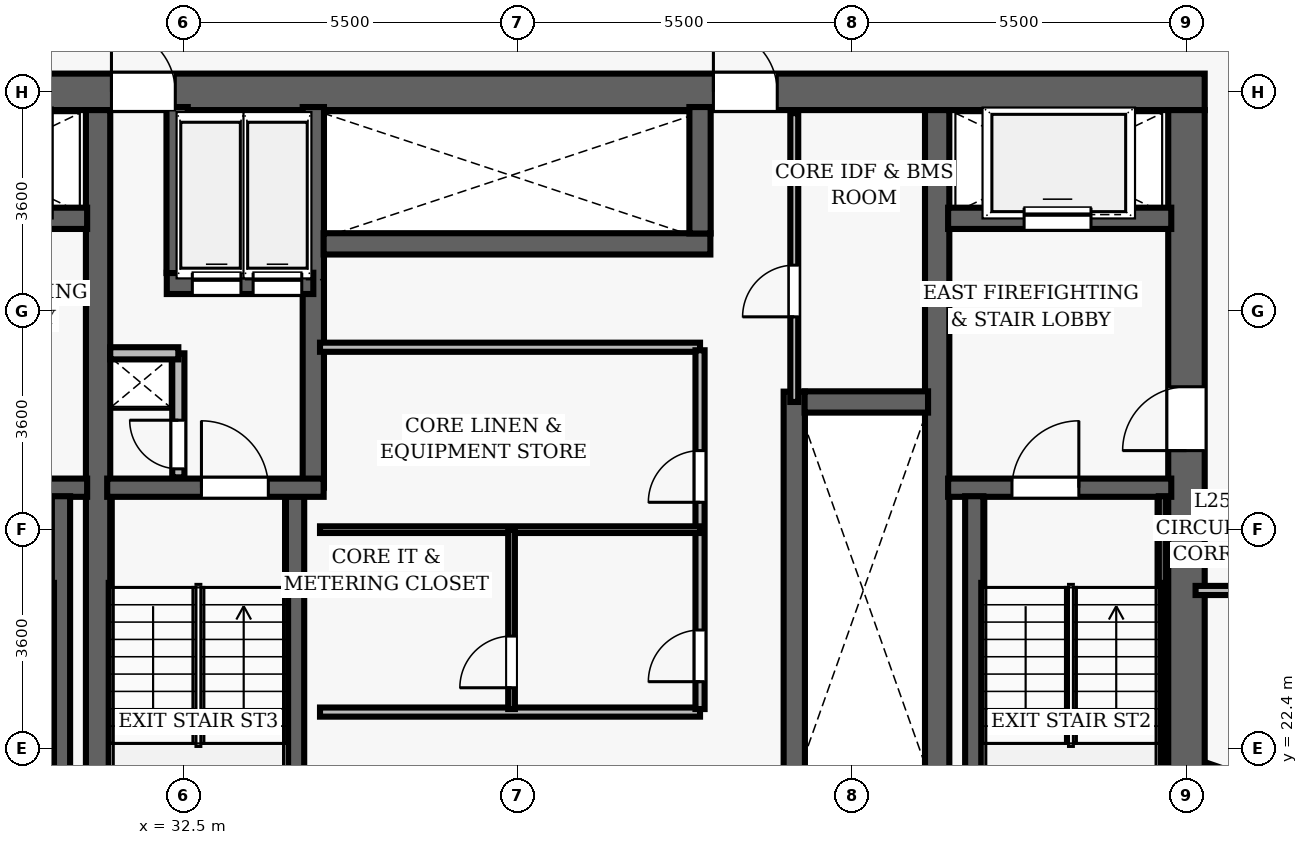
"""IFC4 building model, lengths in metres.
Left out: names, types, materials, properties, quantities, classifications, styles, units other than length and angle.
Written with IfcOpenShell. Run it as: python <this file> out.ifc"""

import sys

from ifc_helpers import new_model, si_unit, direction, frame, frame_2d, origin, place, context, subcontext, project, spatial, rectangle, extrude, element, fill, save


model = new_model("IFC4")
c1 = context("Model", 3, precision=1e-05, world=origin(), true_north=direction((0.0, 1.0)))
c2 = subcontext(c1, "Body", "Model", "MODEL_VIEW")
j1 = project(units=[si_unit("LENGTHUNIT", "METRE"), si_unit("PLANEANGLEUNIT", "RADIAN")], contexts=[c1])
p1 = place(None, origin())
s1 = spatial("IfcSite", under=j1, at=p1, CompositionType="ELEMENT")
p2 = place(p1, origin())
s2 = spatial("IfcBuilding", under=s1, at=p2, CompositionType="ELEMENT")
p3 = place(p2, frame((0.0, 0.0, 106.3)))
s3 = spatial("IfcBuildingStorey", under=s2, at=p3, CompositionType="ELEMENT", Elevation=106.3)
p4 = place(p3, frame((26.7, 33.2, 0.0), z_axis=(0.0, 0.0, 1.0), x_axis=(1.0, 0.0, 0.0)))
e1 = element("IfcWall", 1, at=p4, inside=s3, PredefinedType="SHEAR", context=c2, shape_type="SweptSolid", body=[
    extrude(rectangle(XDim=22.6, YDim=0.6, at=frame_2d((11.3, 0.0))), origin(), (0.0, 0.0, 1.0), 3.5),
])
p5 = place(p4, frame((4.62, 0.0, 0.0)))
e2 = element("IfcOpeningElement", 2, at=p5, cuts=e1, PredefinedType="OPENING", context=c2, shape_type="SweptSolid", body=[
    extrude(rectangle(XDim=1.05, YDim=2.15, at=frame_2d((0.525, 1.075))), frame((0.0, 0.31, 0.0), z_axis=(0.0, -1.0, 0.0), x_axis=(1.0, 0.0, 0.0)), (0.0, 0.0, 1.0), 0.62),
])
p6 = place(p4, frame((14.52, 0.0, 0.0)))
e3 = element("IfcOpeningElement", 3, at=p6, cuts=e1, PredefinedType="OPENING", context=c2, shape_type="SweptSolid", body=[
    extrude(rectangle(XDim=1.05, YDim=2.15, at=frame_2d((0.525, 1.075))), frame((0.0, 0.31, 0.0), z_axis=(0.0, -1.0, 0.0), x_axis=(1.0, 0.0, 0.0)), (0.0, 0.0, 1.0), 0.62),
])
p7 = place(p3, frame((49.0, 19.1, 0.0), z_axis=(0.0, 0.0, 1.0), x_axis=(0.0, 1.0, 0.0)))
e4 = element("IfcWall", 4, at=p7, inside=s3, PredefinedType="SHEAR", context=c2, shape_type="SweptSolid", body=[
    extrude(rectangle(XDim=13.8, YDim=0.6, at=frame_2d((6.9, 0.0))), origin(), (0.0, 0.0, 1.0), 3.5),
])
p8 = place(p7, frame((8.2, 0.0, 0.0)))
e5 = element("IfcOpeningElement", 5, at=p8, cuts=e4, PredefinedType="OPENING", context=c2, shape_type="SweptSolid", body=[
    extrude(rectangle(XDim=1.05, YDim=2.15, at=frame_2d((0.525, 1.075))), frame((0.0, 0.31, 0.0), z_axis=(0.0, -1.0, 0.0), x_axis=(1.0, 0.0, 0.0)), (0.0, 0.0, 1.0), 0.62),
])
for number, where, z_axis, x_axis in (
    (6, (31.1, 19.1, 0.0), (0.0, 0.0, 1.0), (0.0, 1.0, 0.0)),
    (7, (44.9, 19.1, 0.0), (0.0, 0.0, 1.0), (0.0, 1.0, 0.0)),
):
    element("IfcWall", number, at=place(p3, frame(where, z_axis=z_axis, x_axis=x_axis)), inside=s3, PredefinedType="SHEAR", context=c2, shape_type="SweptSolid", body=[
        extrude(rectangle(XDim=13.8, YDim=0.4, at=frame_2d((6.9, 0.0))), origin(), (0.0, 0.0, 1.0), 3.5),
    ])
p9 = place(p3, frame((27.25, 26.69, 0.0), z_axis=(0.0, 0.0, 1.0), x_axis=(1.0, 0.0, 0.0)))
e8 = element("IfcWall", 8, at=p9, inside=s3, PredefinedType="SHEAR", context=c2, shape_type="SweptSolid", body=[
    extrude(rectangle(XDim=3.67, YDim=0.3, at=frame_2d((1.835, 0.0))), origin(), (0.0, 0.0, 1.0), 3.5),
])
p10 = place(p9, frame((1.05, 0.0, 0.0)))
e9 = element("IfcOpeningElement", 9, at=p10, cuts=e8, PredefinedType="OPENING", context=c2, shape_type="SweptSolid", body=[
    extrude(rectangle(XDim=1.1, YDim=2.15, at=frame_2d((0.55, 1.075))), frame((0.0, 0.16, 0.0), z_axis=(0.0, -1.0, 0.0), x_axis=(1.0, 0.0, 0.0)), (0.0, 0.0, 1.0), 0.32),
])
p11 = place(p3, frame((30.49, 19.05, 0.0), z_axis=(0.0, 0.0, 1.0), x_axis=(0.0, 1.0, 0.0)))
e10 = element("IfcWall", 10, at=p11, inside=s3, PredefinedType="SHEAR", context=c2, shape_type="SweptSolid", body=[
    extrude(rectangle(XDim=7.5, YDim=0.3, at=frame_2d((3.75, 0.0))), origin(), (0.0, 0.0, 1.0), 3.5),
])
p12 = place(p3, frame((27.25, 31.12, 0.0), z_axis=(0.0, 0.0, 1.0), x_axis=(1.0, 0.0, 0.0)))
e11 = element("IfcWall", 11, at=p12, inside=s3, PredefinedType="SHEAR", context=c2, shape_type="SweptSolid", body=[
    extrude(rectangle(XDim=3.67, YDim=0.35, at=frame_2d((1.835, 0.0))), origin(), (0.0, 0.0, 1.0), 2.675),
])
p13 = place(p12, frame((1.25, 0.0, 0.0)))
e12 = element("IfcOpeningElement", 12, at=p13, cuts=e11, PredefinedType="OPENING", context=c2, shape_type="SweptSolid", body=[
    extrude(rectangle(XDim=1.1, YDim=2.15, at=frame_2d((0.55, 1.075))), frame((0.0, 0.185, 0.0), z_axis=(0.0, -1.0, 0.0), x_axis=(1.0, 0.0, 0.0)), (0.0, 0.0, 1.0), 0.37),
])
p14 = place(p3, frame((45.08, 26.69, 0.0), z_axis=(0.0, 0.0, 1.0), x_axis=(1.0, 0.0, 0.0)))
e13 = element("IfcWall", 13, at=p14, inside=s3, PredefinedType="SHEAR", context=c2, shape_type="SweptSolid", body=[
    extrude(rectangle(XDim=3.67, YDim=0.3, at=frame_2d((1.835, 0.0))), origin(), (0.0, 0.0, 1.0), 3.5),
])
p15 = place(p14, frame((1.05, 0.0, 0.0)))
e14 = element("IfcOpeningElement", 14, at=p15, cuts=e13, PredefinedType="OPENING", context=c2, shape_type="SweptSolid", body=[
    extrude(rectangle(XDim=1.1, YDim=2.15, at=frame_2d((0.55, 1.075))), frame((0.0, 0.16, 0.0), z_axis=(0.0, -1.0, 0.0), x_axis=(1.0, 0.0, 0.0)), (0.0, 0.0, 1.0), 0.32),
])
p16 = place(p3, frame((45.51, 19.05, 0.0), z_axis=(0.0, 0.0, 1.0), x_axis=(0.0, 1.0, 0.0)))
e15 = element("IfcWall", 15, at=p16, inside=s3, PredefinedType="SHEAR", context=c2, shape_type="SweptSolid", body=[
    extrude(rectangle(XDim=7.5, YDim=0.3, at=frame_2d((3.75, 0.0))), origin(), (0.0, 0.0, 1.0), 3.5),
])
p17 = place(p3, frame((48.605, 19.1, 0.0), z_axis=(0.0, 0.0, 1.0), x_axis=(0.0, 1.0, 0.0)))
e16 = element("IfcWall", 16, at=p17, inside=s3, PredefinedType="SHEAR", context=c2, shape_type="SweptSolid", body=[
    extrude(rectangle(XDim=7.45, YDim=0.12, at=frame_2d((3.725, 0.0))), origin(), (0.0, 0.0, 1.0), 3.5),
])
p18 = place(p3, frame((45.08, 31.12, 0.0), z_axis=(0.0, 0.0, 1.0), x_axis=(1.0, 0.0, 0.0)))
e17 = element("IfcWall", 17, at=p18, inside=s3, PredefinedType="SHEAR", context=c2, shape_type="SweptSolid", body=[
    extrude(rectangle(XDim=3.67, YDim=0.35, at=frame_2d((1.835, 0.0))), origin(), (0.0, 0.0, 1.0), 2.675),
])
p19 = place(p18, frame((1.25, 0.0, 0.0)))
e18 = element("IfcOpeningElement", 18, at=p19, cuts=e17, PredefinedType="OPENING", context=c2, shape_type="SweptSolid", body=[
    extrude(rectangle(XDim=1.1, YDim=2.15, at=frame_2d((0.55, 1.075))), frame((0.0, 0.185, 0.0), z_axis=(0.0, -1.0, 0.0), x_axis=(1.0, 0.0, 0.0)), (0.0, 0.0, 1.0), 0.37),
])
p20 = place(p3, frame((34.34, 19.05, 0.0), z_axis=(0.0, 0.0, 1.0), x_axis=(0.0, 1.0, 0.0)))
e19 = element("IfcWall", 19, at=p20, inside=s3, PredefinedType="SHEAR", context=c2, shape_type="SweptSolid", body=[
    extrude(rectangle(XDim=7.5, YDim=0.3, at=frame_2d((3.75, 0.0))), origin(), (0.0, 0.0, 1.0), 3.5),
])
p21 = place(p3, frame((34.64, 26.69, 0.0), z_axis=(0.0, 0.0, 1.0), x_axis=(0.0, 1.0, 0.0)))
e20 = element("IfcWall", 20, at=p21, inside=s3, PredefinedType="SHEAR", context=c2, shape_type="SweptSolid", body=[
    extrude(rectangle(XDim=6.26, YDim=0.35, at=frame_2d((3.13, 0.0))), origin(), (0.0, 0.0, 1.0), 3.5),
])
p22 = place(p3, frame((31.25, 26.69, 0.0), z_axis=(0.0, 0.0, 1.0), x_axis=(1.0, 0.0, 0.0)))
e21 = element("IfcWall", 21, at=p22, inside=s3, PredefinedType="SHEAR", context=c2, shape_type="SweptSolid", body=[
    extrude(rectangle(XDim=3.56, YDim=0.3, at=frame_2d((1.78, 0.0))), origin(), (0.0, 0.0, 1.0), 3.5),
])
p23 = place(p22, frame((1.55, 0.0, 0.0)))
e22 = element("IfcOpeningElement", 22, at=p23, cuts=e21, PredefinedType="OPENING", context=c2, shape_type="SweptSolid", body=[
    extrude(rectangle(XDim=1.1, YDim=2.15, at=frame_2d((0.55, 1.075))), frame((0.0, 0.16, 0.0), z_axis=(0.0, -1.0, 0.0), x_axis=(1.0, 0.0, 0.0)), (0.0, 0.0, 1.0), 0.32),
])
p24 = place(p3, frame((32.23, 30.05, 0.0), z_axis=(0.0, 0.0, 1.0), x_axis=(1.0, 0.0, 0.0)))
e23 = element("IfcWall", 23, at=p24, inside=s3, PredefinedType="SHEAR", context=c2, shape_type="SweptSolid", body=[
    extrude(rectangle(XDim=2.41, YDim=0.35, at=frame_2d((1.205, 0.0))), origin(), (0.0, 0.0, 1.0), 2.675),
])
p25 = place(p24, frame((0.42, 0.0, 0.0)))
e24 = element("IfcOpeningElement", 24, at=p25, cuts=e23, PredefinedType="OPENING", context=c2, shape_type="SweptSolid", body=[
    extrude(rectangle(XDim=0.8, YDim=2.15, at=frame_2d((0.4, 1.075))), frame((0.0, 0.185, 0.0), z_axis=(0.0, -1.0, 0.0), x_axis=(1.0, 0.0, 0.0)), (0.0, 0.0, 1.0), 0.37),
])
p26 = place(p24, frame((1.42, 0.0, 0.0)))
e25 = element("IfcOpeningElement", 25, at=p26, cuts=e23, PredefinedType="OPENING", context=c2, shape_type="SweptSolid", body=[
    extrude(rectangle(XDim=0.8, YDim=2.15, at=frame_2d((0.4, 1.075))), frame((0.0, 0.185, 0.0), z_axis=(0.0, -1.0, 0.0), x_axis=(1.0, 0.0, 0.0)), (0.0, 0.0, 1.0), 0.37),
])
p27 = place(p3, frame((32.4, 30.22, 0.0), z_axis=(0.0, 0.0, 1.0), x_axis=(0.0, 1.0, 0.0)))
e26 = element("IfcWall", 26, at=p27, inside=s3, PredefinedType="SHEAR", context=c2, shape_type="SweptSolid", body=[
    extrude(rectangle(XDim=2.73, YDim=0.35, at=frame_2d((1.365, 0.0))), origin(), (0.0, 0.0, 1.0), 2.675),
])
p28 = place(p3, frame((32.42, 26.86, 0.0), z_axis=(0.0, 0.0, 1.0), x_axis=(0.0, 1.0, 0.0)))
e27 = element("IfcWall", 27, at=p28, inside=s3, PredefinedType="PARTITIONING", context=c2, shape_type="SweptSolid", body=[
    extrude(rectangle(XDim=2.04, YDim=0.2, at=frame_2d((1.02, 0.0))), origin(), (0.0, 0.0, 1.0), 2.675),
])
p29 = place(p28, frame((0.14, 0.0, 0.0)))
e28 = element("IfcOpeningElement", 28, at=p29, cuts=e27, PredefinedType="OPENING", context=c2, shape_type="SweptSolid", body=[
    extrude(rectangle(XDim=0.8, YDim=2.05, at=frame_2d((0.4, 1.025))), frame((0.0, 0.11, 0.0), z_axis=(0.0, -1.0, 0.0), x_axis=(1.0, 0.0, 0.0)), (0.0, 0.0, 1.0), 0.22),
])
p30 = place(p3, frame((31.3, 28.9, 0.0), z_axis=(0.0, 0.0, 1.0), x_axis=(1.0, 0.0, 0.0)))
e29 = element("IfcWall", 29, at=p30, inside=s3, PredefinedType="PARTITIONING", context=c2, shape_type="SweptSolid", body=[
    extrude(rectangle(XDim=1.12, YDim=0.2, at=frame_2d((0.56, 0.0))), origin(), (0.0, 0.0, 1.0), 2.675),
])
p31 = place(p3, frame((42.55, 21.73, 0.0), z_axis=(0.0, 0.0, 1.0), x_axis=(0.0, 1.0, 0.0)))
e30 = element("IfcWall", 30, at=p31, inside=s3, PredefinedType="SHEAR", context=c2, shape_type="SweptSolid", body=[
    extrude(rectangle(XDim=6.54, YDim=0.35, at=frame_2d((3.27, 0.0))), origin(), (0.0, 0.0, 1.0), 2.675),
])
p32 = place(p3, frame((42.72, 28.1, 0.0), z_axis=(0.0, 0.0, 1.0), x_axis=(1.0, 0.0, 0.0)))
e31 = element("IfcWall", 31, at=p32, inside=s3, PredefinedType="SHEAR", context=c2, shape_type="SweptSolid", body=[
    extrude(rectangle(XDim=2.03, YDim=0.35, at=frame_2d((1.015, 0.0))), origin(), (0.0, 0.0, 1.0), 2.675),
])
p33 = place(p3, frame((34.81, 30.7, 0.0), z_axis=(0.0, 0.0, 1.0), x_axis=(1.0, 0.0, 0.0)))
e32 = element("IfcWall", 32, at=p33, inside=s3, PredefinedType="SHEAR", context=c2, shape_type="SweptSolid", body=[
    extrude(rectangle(XDim=6.36, YDim=0.35, at=frame_2d((3.18, 0.0))), origin(), (0.0, 0.0, 1.0), 2.675),
])
p34 = place(p3, frame((41.0, 30.87, 0.0), z_axis=(0.0, 0.0, 1.0), x_axis=(0.0, 1.0, 0.0)))
e33 = element("IfcWall", 33, at=p34, inside=s3, PredefinedType="SHEAR", context=c2, shape_type="SweptSolid", body=[
    extrude(rectangle(XDim=2.08, YDim=0.35, at=frame_2d((1.04, 0.0))), origin(), (0.0, 0.0, 1.0), 2.675),
])
for number, where, z_axis, x_axis in (
    (34, (34.75, 29.0, 0.0), (0.0, 0.0, 1.0), (1.0, 0.0, 0.0)),
    (35, (34.75, 23.0, 0.0), (0.0, 0.0, 1.0), (1.0, 0.0, 0.0)),
):
    element("IfcWall", number, at=place(p3, frame(where, z_axis=z_axis, x_axis=x_axis)), inside=s3, PredefinedType="PARTITIONING", context=c2, shape_type="SweptSolid", body=[
        extrude(rectangle(XDim=6.25, YDim=0.15, at=frame_2d((3.125, 0.0))), origin(), (0.0, 0.0, 1.0), 2.675),
    ])
p35 = place(p3, frame((41.0, 23.05, 0.0), z_axis=(0.0, 0.0, 1.0), x_axis=(0.0, 1.0, 0.0)))
e36 = element("IfcWall", 36, at=p35, inside=s3, PredefinedType="PARTITIONING", context=c2, shape_type="SweptSolid", body=[
    extrude(rectangle(XDim=5.9, YDim=0.15, at=frame_2d((2.95, 0.0))), origin(), (0.0, 0.0, 1.0), 2.675),
])
p36 = place(p35, frame((3.4, 0.0, 0.0)))
e37 = element("IfcOpeningElement", 37, at=p36, cuts=e36, PredefinedType="OPENING", context=c2, shape_type="SweptSolid", body=[
    extrude(rectangle(XDim=0.85, YDim=2.1, at=frame_2d((0.425, 1.05))), frame((0.0, 0.085, 0.0), z_axis=(0.0, -1.0, 0.0), x_axis=(1.0, 0.0, 0.0)), (0.0, 0.0, 1.0), 0.17),
])
p37 = place(p35, frame((0.45, 0.0, 0.0)))
e38 = element("IfcOpeningElement", 38, at=p37, cuts=e36, PredefinedType="OPENING", context=c2, shape_type="SweptSolid", body=[
    extrude(rectangle(XDim=0.85, YDim=2.1, at=frame_2d((0.425, 1.05))), frame((0.0, 0.085, 0.0), z_axis=(0.0, -1.0, 0.0), x_axis=(1.0, 0.0, 0.0)), (0.0, 0.0, 1.0), 0.17),
])
p38 = place(p3, frame((34.75, 26.0, 0.0), z_axis=(0.0, 0.0, 1.0), x_axis=(1.0, 0.0, 0.0)))
e39 = element("IfcWall", 39, at=p38, inside=s3, PredefinedType="PARTITIONING", context=c2, shape_type="SweptSolid", body=[
    extrude(rectangle(XDim=6.25, YDim=0.11, at=frame_2d((3.125, 0.0))), origin(), (0.0, 0.0, 1.0), 2.675),
])
p39 = place(p3, frame((37.9, 23.05, 0.0), z_axis=(0.0, 0.0, 1.0), x_axis=(0.0, 1.0, 0.0)))
e40 = element("IfcWall", 40, at=p39, inside=s3, PredefinedType="PARTITIONING", context=c2, shape_type="SweptSolid", body=[
    extrude(rectangle(XDim=2.95, YDim=0.11, at=frame_2d((1.475, 0.0))), origin(), (0.0, 0.0, 1.0), 2.675),
])
p40 = place(p39, frame((0.35, 0.0, 0.0)))
e41 = element("IfcOpeningElement", 41, at=p40, cuts=e40, PredefinedType="OPENING", context=c2, shape_type="SweptSolid", body=[
    extrude(rectangle(XDim=0.85, YDim=2.1, at=frame_2d((0.425, 1.05))), frame((0.0, 0.065, 0.0), z_axis=(0.0, -1.0, 0.0), x_axis=(1.0, 0.0, 0.0)), (0.0, 0.0, 1.0), 0.13),
])
p41 = place(p3, frame((42.55, 28.1, 0.0), z_axis=(0.0, 0.0, 1.0), x_axis=(0.0, 1.0, 0.0)))
e42 = element("IfcWall", 42, at=p41, inside=s3, PredefinedType="PARTITIONING", context=c2, shape_type="SweptSolid", body=[
    extrude(rectangle(XDim=4.75, YDim=0.13, at=frame_2d((2.375, 0.0))), origin(), (0.0, 0.0, 1.0), 2.675),
])
p42 = place(p41, frame((1.4, 0.0, 0.0)))
e43 = element("IfcOpeningElement", 43, at=p42, cuts=e42, PredefinedType="OPENING", context=c2, shape_type="SweptSolid", body=[
    extrude(rectangle(XDim=0.85, YDim=2.1, at=frame_2d((0.425, 1.05))), frame((0.0, 0.075, 0.0), z_axis=(0.0, -1.0, 0.0), x_axis=(1.0, 0.0, 0.0)), (0.0, 0.0, 1.0), 0.15),
])
p43 = place(p3, frame((49.15, 25.0, 0.0), z_axis=(0.0, 0.0, 1.0), x_axis=(1.0, 0.0, 0.0)))
e44 = element("IfcWall", 44, at=p43, inside=s3, PredefinedType="PARTITIONING", context=c2, shape_type="SweptSolid", body=[
    extrude(rectangle(XDim=12.35, YDim=0.15, at=frame_2d((6.175, 0.0))), origin(), (0.0, 0.0, 1.0), 2.675),
])
p44 = place(p43, frame((2.613, 0.0, 0.0)))
e45 = element("IfcOpeningElement", 45, at=p44, cuts=e44, PredefinedType="OPENING", context=c2, shape_type="SweptSolid", body=[
    extrude(rectangle(XDim=0.95, YDim=2.15, at=frame_2d((0.475, 1.075))), frame((0.0, 0.085, 0.0), z_axis=(0.0, -1.0, 0.0), x_axis=(1.0, 0.0, 0.0)), (0.0, 0.0, 1.0), 0.17),
])
p45 = place(p3, frame((49.32, 22.102, 0.0), z_axis=(0.0, 0.0, 1.0), x_axis=(0.945519124535, -0.325566560229, 0.0)))
e46 = element("IfcWall", 46, at=p45, inside=s3, PredefinedType="PARTITIONING", context=c2, shape_type="SweptSolid", body=[
    extrude(rectangle(XDim=16.216, YDim=0.13, at=frame_2d((8.108, 0.0))), origin(), (0.0, 0.0, 1.0), 2.675),
])
p46 = place(p15, origin())
e47 = element("IfcDoor", 47, at=p46, inside=s3, OperationType="SINGLE_SWING_RIGHT", PredefinedType="DOOR", context=c2, shape_type="SweptSolid", body=[
    extrude(rectangle(XDim=1.1, YDim=2.15, at=frame_2d((0.55, 1.075))), frame((0.0, 0.025, 0.0), z_axis=(0.0, -1.0, 0.0), x_axis=(1.0, 0.0, 0.0)), (0.0, 0.0, 1.0), 0.05),
])
fill(e14, e47)
p47 = place(p8, origin())
e48 = element("IfcDoor", 48, at=p47, inside=s3, OperationType="SINGLE_SWING_LEFT", PredefinedType="DOOR", context=c2, shape_type="SweptSolid", body=[
    extrude(rectangle(XDim=1.05, YDim=2.15, at=frame_2d((0.525, 1.075))), frame((0.0, 0.025, 0.0), z_axis=(0.0, -1.0, 0.0), x_axis=(1.0, 0.0, 0.0)), (0.0, 0.0, 1.0), 0.05),
])
fill(e5, e48)
p48 = place(p23, origin())
e49 = element("IfcDoor", 49, at=p48, inside=s3, OperationType="SINGLE_SWING_LEFT", PredefinedType="DOOR", context=c2, shape_type="SweptSolid", body=[
    extrude(rectangle(XDim=1.1, YDim=2.15, at=frame_2d((0.55, 1.075))), frame((0.0, 0.025, 0.0), z_axis=(0.0, -1.0, 0.0), x_axis=(1.0, 0.0, 0.0)), (0.0, 0.0, 1.0), 0.05),
])
fill(e22, e49)
p49 = place(p29, origin())
e50 = element("IfcDoor", 50, at=p49, inside=s3, OperationType="SINGLE_SWING_RIGHT", PredefinedType="DOOR", context=c2, shape_type="SweptSolid", body=[
    extrude(rectangle(XDim=0.8, YDim=2.05, at=frame_2d((0.4, 1.025))), frame((0.0, 0.025, 0.0), z_axis=(0.0, -1.0, 0.0), x_axis=(1.0, 0.0, 0.0)), (0.0, 0.0, 1.0), 0.05),
])
fill(e28, e50)
p50 = place(p5, origin())
e51 = element("IfcDoor", 51, at=p50, inside=s3, OperationType="SINGLE_SWING_LEFT", PredefinedType="DOOR", context=c2, shape_type="SweptSolid", body=[
    extrude(rectangle(XDim=1.05, YDim=2.15, at=frame_2d((0.525, 1.075))), frame((0.0, 0.025, 0.0), z_axis=(0.0, -1.0, 0.0), x_axis=(1.0, 0.0, 0.0)), (0.0, 0.0, 1.0), 0.05),
])
fill(e2, e51)
p51 = place(p6, origin())
e52 = element("IfcDoor", 52, at=p51, inside=s3, OperationType="SINGLE_SWING_LEFT", PredefinedType="DOOR", context=c2, shape_type="SweptSolid", body=[
    extrude(rectangle(XDim=1.05, YDim=2.15, at=frame_2d((0.525, 1.075))), frame((0.0, 0.025, 0.0), z_axis=(0.0, -1.0, 0.0), x_axis=(1.0, 0.0, 0.0)), (0.0, 0.0, 1.0), 0.05),
])
fill(e3, e52)
p52 = place(p36, origin())
e53 = element("IfcDoor", 53, at=p52, inside=s3, OperationType="SINGLE_SWING_LEFT", PredefinedType="DOOR", context=c2, shape_type="SweptSolid", body=[
    extrude(rectangle(XDim=0.85, YDim=2.1, at=frame_2d((0.425, 1.05))), frame((0.0, 0.025, 0.0), z_axis=(0.0, -1.0, 0.0), x_axis=(1.0, 0.0, 0.0)), (0.0, 0.0, 1.0), 0.05),
])
fill(e37, e53)
p53 = place(p37, origin())
e54 = element("IfcDoor", 54, at=p53, inside=s3, OperationType="SINGLE_SWING_LEFT", PredefinedType="DOOR", context=c2, shape_type="SweptSolid", body=[
    extrude(rectangle(XDim=0.85, YDim=2.1, at=frame_2d((0.425, 1.05))), frame((0.0, 0.025, 0.0), z_axis=(0.0, -1.0, 0.0), x_axis=(1.0, 0.0, 0.0)), (0.0, 0.0, 1.0), 0.05),
])
fill(e38, e54)
p54 = place(p40, origin())
e55 = element("IfcDoor", 55, at=p54, inside=s3, OperationType="SINGLE_SWING_LEFT", PredefinedType="DOOR", context=c2, shape_type="SweptSolid", body=[
    extrude(rectangle(XDim=0.85, YDim=2.1, at=frame_2d((0.425, 1.05))), frame((0.0, 0.025, 0.0), z_axis=(0.0, -1.0, 0.0), x_axis=(1.0, 0.0, 0.0)), (0.0, 0.0, 1.0), 0.05),
])
fill(e41, e55)
p55 = place(p42, origin())
e56 = element("IfcDoor", 56, at=p55, inside=s3, OperationType="SINGLE_SWING_LEFT", PredefinedType="DOOR", context=c2, shape_type="SweptSolid", body=[
    extrude(rectangle(XDim=0.85, YDim=2.1, at=frame_2d((0.425, 1.05))), frame((0.0, 0.025, 0.0), z_axis=(0.0, -1.0, 0.0), x_axis=(1.0, 0.0, 0.0)), (0.0, 0.0, 1.0), 0.05),
])
fill(e43, e56)
p56 = place(p19, origin())
e57 = element("IfcDoor", 57, at=p56, inside=s3, OperationType="SLIDING_TO_LEFT", PredefinedType="DOOR", context=c2, shape_type="SweptSolid", body=[
    extrude(rectangle(XDim=1.1, YDim=2.15, at=frame_2d((0.55, 1.075))), frame((0.0, 0.025, 0.0), z_axis=(0.0, -1.0, 0.0), x_axis=(1.0, 0.0, 0.0)), (0.0, 0.0, 1.0), 0.05),
])
fill(e18, e57)
p57 = place(p25, origin())
e58 = element("IfcDoor", 58, at=p57, inside=s3, OperationType="SLIDING_TO_LEFT", PredefinedType="DOOR", context=c2, shape_type="SweptSolid", body=[
    extrude(rectangle(XDim=0.8, YDim=2.15, at=frame_2d((0.4, 1.075))), frame((0.0, 0.025, 0.0), z_axis=(0.0, -1.0, 0.0), x_axis=(1.0, 0.0, 0.0)), (0.0, 0.0, 1.0), 0.05),
])
fill(e24, e58)
p58 = place(p26, origin())
e59 = element("IfcDoor", 59, at=p58, inside=s3, OperationType="SLIDING_TO_LEFT", PredefinedType="DOOR", context=c2, shape_type="SweptSolid", body=[
    extrude(rectangle(XDim=0.8, YDim=2.15, at=frame_2d((0.4, 1.075))), frame((0.0, 0.025, 0.0), z_axis=(0.0, -1.0, 0.0), x_axis=(1.0, 0.0, 0.0)), (0.0, 0.0, 1.0), 0.05),
])
fill(e25, e59)
save(model, sys.argv[1])
